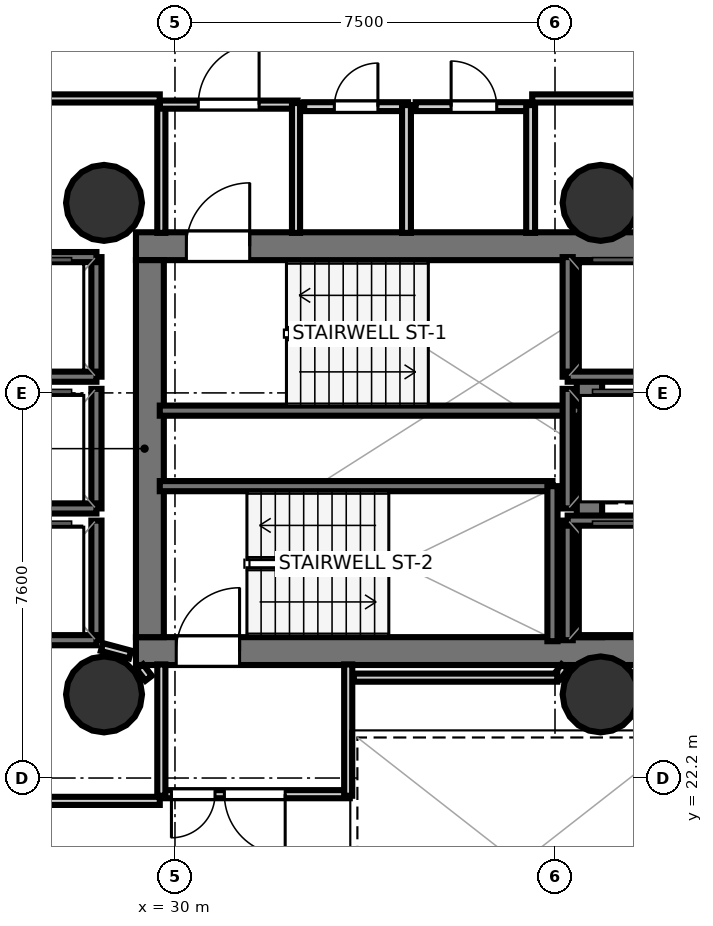
"""IFC4 building model, lengths in metres.
Left out: names, types, materials, properties, quantities, classifications, styles, units other than length and angle.
Written with IfcOpenShell. Run it as: python <this file> out.ifc"""

import sys

from ifc_helpers import new_model, si_unit, direction, frame, frame_2d, origin, origin_2d, place, context, subcontext, project, spatial, rectangle, hollow_circle, extrude, element, fill, save


model = new_model("IFC4")
c1 = context("Model", 3, precision=1e-05, world=origin(), true_north=direction((0.0, 1.0)))
c2 = subcontext(c1, "Body", "Model", "MODEL_VIEW")
j1 = project(units=[si_unit("LENGTHUNIT", "METRE"), si_unit("PLANEANGLEUNIT", "RADIAN")], contexts=[c1])
p1 = place(None, origin())
s1 = spatial("IfcSite", under=j1, at=p1, CompositionType="ELEMENT")
p2 = place(p1, origin())
s2 = spatial("IfcBuilding", under=s1, at=p2, CompositionType="ELEMENT")
p3 = place(p2, frame((0.0, 0.0, 105.2)))
s3 = spatial("IfcBuildingStorey", under=s2, at=p3, CompositionType="ELEMENT", Elevation=105.2)
p4 = place(p3, frame((29.23, 32.695, 0.0), z_axis=(0.0, 0.0, 1.0), x_axis=(1.0, 0.0, 0.0)))
e1 = element("IfcWall", 1, at=p4, inside=s3, PredefinedType="SHEAR", context=c2, shape_type="SweptSolid", body=[
    extrude(rectangle(XDim=10.62, YDim=0.55, at=frame_2d((5.31, 0.0))), origin(), (0.0, 0.0, 1.0), 3.52),
])
p5 = place(p4, frame((0.995, 0.0, 0.0)))
e2 = element("IfcOpeningElement", 2, at=p5, cuts=e1, PredefinedType="OPENING", context=c2, shape_type="SweptSolid", body=[
    extrude(rectangle(XDim=1.25, YDim=2.15, at=frame_2d((0.625, 1.075))), frame((0.0, 0.285, 0.0), z_axis=(0.0, -1.0, 0.0), x_axis=(1.0, 0.0, 0.0)), (0.0, 0.0, 1.0), 0.57),
])
p6 = place(p3, frame((29.23, 24.705, 0.0), z_axis=(0.0, 0.0, 1.0), x_axis=(1.0, 0.0, 0.0)))
e3 = element("IfcWall", 3, at=p6, inside=s3, PredefinedType="SHEAR", context=c2, shape_type="SweptSolid", body=[
    extrude(rectangle(XDim=10.62, YDim=0.55, at=frame_2d((5.31, 0.0))), origin(), (0.0, 0.0, 1.0), 3.52),
])
p7 = place(p6, frame((0.795, 0.0, 0.0)))
e4 = element("IfcOpeningElement", 4, at=p7, cuts=e3, PredefinedType="OPENING", context=c2, shape_type="SweptSolid", body=[
    extrude(rectangle(XDim=1.25, YDim=2.15, at=frame_2d((0.625, 1.075))), frame((0.0, 0.285, 0.0), z_axis=(0.0, -1.0, 0.0), x_axis=(1.0, 0.0, 0.0)), (0.0, 0.0, 1.0), 0.57),
])
p8 = place(p3, frame((29.505, 24.98, 0.0), z_axis=(0.0, 0.0, 1.0), x_axis=(0.0, 1.0, 0.0)))
e5 = element("IfcWall", 5, at=p8, inside=s3, PredefinedType="SHEAR", context=c2, shape_type="SweptSolid", body=[
    extrude(rectangle(XDim=7.44, YDim=0.55, at=frame_2d((3.72, 0.0))), origin(), (0.0, 0.0, 1.0), 3.52),
])
p9 = place(p3, frame((38.18, 24.98, 0.0), z_axis=(0.0, 0.0, 1.0), x_axis=(0.0, 1.0, 0.0)))
e6 = element("IfcWall", 6, at=p9, inside=s3, PredefinedType="SHEAR", context=c2, shape_type="SweptSolid", body=[
    extrude(rectangle(XDim=7.44, YDim=0.5, at=frame_2d((3.72, 0.0))), origin(), (0.0, 0.0, 1.0), 3.52),
])
for number, where, z_axis, x_axis in (
    (7, (28.6, 33.55, 0.0), (0.0, 0.0, 1.0), (1.0, 0.0, 0.0)),
    (8, (28.6, 23.85, 0.0), (0.0, 0.0, 1.0), (1.0, 0.0, 0.0)),
    (9, (38.4, 33.55, 0.0), (0.0, 0.0, 1.0), (1.0, 0.0, 0.0)),
    (10, (38.4, 23.85, 0.0), (0.0, 0.0, 1.0), (1.0, 0.0, 0.0)),
):
    element("IfcColumn", number, at=place(p3, frame(where, z_axis=z_axis, x_axis=x_axis)), inside=s3, PredefinedType="COLUMN", context=c2, shape_type="SweptSolid", body=[
        extrude(hollow_circle(Radius=0.75, WallThickness=0.036, at=origin_2d()), origin(), (0.0, 0.0, 1.0), 3.7),
    ])
p10 = place(p3, frame((29.7, 29.45, 0.0), z_axis=(0.0, 0.0, 1.0), x_axis=(1.0, 0.0, 0.0)))
e11 = element("IfcWall", 11, at=p10, inside=s3, PredefinedType="SOLIDWALL", context=c2, shape_type="SweptSolid", body=[
    extrude(rectangle(XDim=8.3, YDim=0.2, at=frame_2d((4.15, 0.0))), origin(), (0.0, 0.0, 1.0), 3.52),
])
p11 = place(p3, frame((29.7, 27.96, 0.0), z_axis=(0.0, 0.0, 1.0), x_axis=(1.0, 0.0, 0.0)))
e12 = element("IfcWall", 12, at=p11, inside=s3, PredefinedType="SOLIDWALL", context=c2, shape_type="SweptSolid", body=[
    extrude(rectangle(XDim=7.75, YDim=0.2, at=frame_2d((3.875, 0.0))), origin(), (0.0, 0.0, 1.0), 3.52),
])
p12 = place(p3, frame((37.45, 24.9, 0.0), z_axis=(0.0, 0.0, 1.0), x_axis=(0.0, 1.0, 0.0)))
e13 = element("IfcWall", 13, at=p12, inside=s3, PredefinedType="SOLIDWALL", context=c2, shape_type="SweptSolid", body=[
    extrude(rectangle(XDim=3.06, YDim=0.2, at=frame_2d((1.53, 0.0))), origin(), (0.0, 0.0, 1.0), 3.52),
])
p13 = place(p3, frame((37.75, 30.12, 0.0), z_axis=(0.0, 0.0, 1.0), x_axis=(0.0, 1.0, 0.0)))
e14 = element("IfcWall", 14, at=p13, inside=s3, PredefinedType="SOLIDWALL", context=c2, shape_type="SweptSolid", body=[
    extrude(rectangle(XDim=2.36, YDim=0.2, at=frame_2d((1.18, 0.0))), origin(), (0.0, 0.0, 1.0), 3.52),
])
p14 = place(p3, frame((37.75, 30.12, 0.0), z_axis=(0.0, 0.0, 1.0), x_axis=(1.0, 0.0, 0.0)))
e15 = element("IfcWall", 15, at=p14, inside=s3, PredefinedType="SOLIDWALL", context=c2, shape_type="SweptSolid", body=[
    extrude(rectangle(XDim=2.1, YDim=0.2, at=frame_2d((1.05, 0.0))), origin(), (0.0, 0.0, 1.0), 3.52),
])
p15 = place(p3, frame((37.75, 24.92, 0.0), z_axis=(0.0, 0.0, 1.0), x_axis=(0.0, 1.0, 0.0)))
e16 = element("IfcWall", 16, at=p15, inside=s3, PredefinedType="SOLIDWALL", context=c2, shape_type="SweptSolid", body=[
    extrude(rectangle(XDim=2.36, YDim=0.2, at=frame_2d((1.18, 0.0))), origin(), (0.0, 0.0, 1.0), 3.52),
])
p16 = place(p3, frame((37.75, 27.28, 0.0), z_axis=(0.0, 0.0, 1.0), x_axis=(1.0, 0.0, 0.0)))
e17 = element("IfcWall", 17, at=p16, inside=s3, PredefinedType="SOLIDWALL", context=c2, shape_type="SweptSolid", body=[
    extrude(rectangle(XDim=2.1, YDim=0.2, at=frame_2d((1.05, 0.0))), origin(), (0.0, 0.0, 1.0), 3.52),
])
p17 = place(p3, frame((28.45, 30.12, 0.0), z_axis=(0.0, 0.0, 1.0), x_axis=(0.0, 1.0, 0.0)))
e18 = element("IfcWall", 18, at=p17, inside=s3, PredefinedType="SOLIDWALL", context=c2, shape_type="SweptSolid", body=[
    extrude(rectangle(XDim=2.36, YDim=0.2, at=frame_2d((1.18, 0.0))), origin(), (0.0, 0.0, 1.0), 3.52),
])
for number, where, z_axis, x_axis in (
    (19, (26.35, 32.48, 0.0), (0.0, 0.0, 1.0), (1.0, 0.0, 0.0)),
    (20, (26.35, 30.12, 0.0), (0.0, 0.0, 1.0), (1.0, 0.0, 0.0)),
):
    element("IfcWall", number, at=place(p3, frame(where, z_axis=z_axis, x_axis=x_axis)), inside=s3, PredefinedType="SOLIDWALL", context=c2, shape_type="SweptSolid", body=[
        extrude(rectangle(XDim=2.1, YDim=0.2, at=frame_2d((1.05, 0.0))), origin(), (0.0, 0.0, 1.0), 3.52),
    ])
p18 = place(p3, frame((28.45, 27.52, 0.0), z_axis=(0.0, 0.0, 1.0), x_axis=(0.0, 1.0, 0.0)))
e21 = element("IfcWall", 21, at=p18, inside=s3, PredefinedType="SOLIDWALL", context=c2, shape_type="SweptSolid", body=[
    extrude(rectangle(XDim=2.36, YDim=0.2, at=frame_2d((1.18, 0.0))), origin(), (0.0, 0.0, 1.0), 3.52),
])
p19 = place(p3, frame((26.35, 27.52, 0.0), z_axis=(0.0, 0.0, 1.0), x_axis=(1.0, 0.0, 0.0)))
e22 = element("IfcWall", 22, at=p19, inside=s3, PredefinedType="SOLIDWALL", context=c2, shape_type="SweptSolid", body=[
    extrude(rectangle(XDim=2.1, YDim=0.2, at=frame_2d((1.05, 0.0))), origin(), (0.0, 0.0, 1.0), 3.52),
])
p20 = place(p3, frame((28.45, 24.92, 0.0), z_axis=(0.0, 0.0, 1.0), x_axis=(0.0, 1.0, 0.0)))
e23 = element("IfcWall", 23, at=p20, inside=s3, PredefinedType="SOLIDWALL", context=c2, shape_type="SweptSolid", body=[
    extrude(rectangle(XDim=2.36, YDim=0.2, at=frame_2d((1.18, 0.0))), origin(), (0.0, 0.0, 1.0), 3.52),
])
p21 = place(p3, frame((26.35, 24.92, 0.0), z_axis=(0.0, 0.0, 1.0), x_axis=(1.0, 0.0, 0.0)))
e24 = element("IfcWall", 24, at=p21, inside=s3, PredefinedType="SOLIDWALL", context=c2, shape_type="SweptSolid", body=[
    extrude(rectangle(XDim=2.1, YDim=0.2, at=frame_2d((1.05, 0.0))), origin(), (0.0, 0.0, 1.0), 3.52),
])
p22 = place(p3, frame((37.75, 27.52, 0.0), z_axis=(0.0, 0.0, 1.0), x_axis=(0.0, 1.0, 0.0)))
e25 = element("IfcWall", 25, at=p22, inside=s3, PredefinedType="SOLIDWALL", context=c2, shape_type="SweptSolid", body=[
    extrude(rectangle(XDim=2.36, YDim=0.2, at=frame_2d((1.18, 0.0))), origin(), (0.0, 0.0, 1.0), 3.52),
])
p23 = place(p3, frame((29.731, 32.958, 0.0), z_axis=(0.0, 0.0, 1.0), x_axis=(0.0, 1.0, 0.0)))
e26 = element("IfcWall", 26, at=p23, inside=s3, PredefinedType="PARTITIONING", context=c2, shape_type="SweptSolid", body=[
    extrude(rectangle(XDim=2.562, YDim=0.16, at=frame_2d((1.281, 0.0))), origin(), (0.0, 0.0, 1.0), 2.84),
])
p24 = place(p3, frame((29.7, 35.489, 0.0), z_axis=(0.0, 0.0, 1.0), x_axis=(1.0, 0.0, 0.0)))
e27 = element("IfcWall", 27, at=p24, inside=s3, PredefinedType="PARTITIONING", context=c2, shape_type="SweptSolid", body=[
    extrude(rectangle(XDim=2.72, YDim=0.16, at=frame_2d((1.36, 0.0))), origin(), (0.0, 0.0, 1.0), 2.84),
])
p25 = place(p24, frame((0.76, 0.0, 0.0)))
e28 = element("IfcOpeningElement", 28, at=p25, cuts=e27, PredefinedType="OPENING", context=c2, shape_type="SweptSolid", body=[
    extrude(rectangle(XDim=1.2, YDim=2.15, at=frame_2d((0.6, 1.075))), frame((0.0, 0.09, 0.0), z_axis=(0.0, -1.0, 0.0), x_axis=(1.0, 0.0, 0.0)), (0.0, 0.0, 1.0), 0.18),
])
p26 = place(p3, frame((32.389, 35.52, 0.0), z_axis=(0.0, 0.0, 1.0), x_axis=(0.0, -1.0, 0.0)))
e29 = element("IfcWall", 29, at=p26, inside=s3, PredefinedType="PARTITIONING", context=c2, shape_type="SweptSolid", body=[
    extrude(rectangle(XDim=2.562, YDim=0.16, at=frame_2d((1.281, 0.0))), origin(), (0.0, 0.0, 1.0), 2.84),
])
p27 = place(p3, frame((33.45, 21.881, 0.0), z_axis=(0.0, 0.0, 1.0), x_axis=(-1.0, 0.0, 0.0)))
e30 = element("IfcWall", 30, at=p27, inside=s3, PredefinedType="PARTITIONING", context=c2, shape_type="SweptSolid", body=[
    extrude(rectangle(XDim=3.75, YDim=0.16, at=frame_2d((1.875, 0.0))), origin(), (0.0, 0.0, 1.0), 2.84),
])
p28 = place(p27, frame((1.275, 0.0, 0.0)))
e31 = element("IfcOpeningElement", 31, at=p28, cuts=e30, PredefinedType="OPENING", context=c2, shape_type="SweptSolid", body=[
    extrude(rectangle(XDim=1.2, YDim=2.15, at=frame_2d((0.6, 1.075))), frame((0.0, 0.09, 0.0), z_axis=(0.0, -1.0, 0.0), x_axis=(1.0, 0.0, 0.0)), (0.0, 0.0, 1.0), 0.18),
])
p29 = place(p27, frame((2.66, 0.0, 0.0)))
e32 = element("IfcOpeningElement", 32, at=p29, cuts=e30, PredefinedType="OPENING", context=c2, shape_type="SweptSolid", body=[
    extrude(rectangle(XDim=0.86, YDim=2.05, at=frame_2d((0.43, 1.025))), frame((0.0, 0.09, 0.0), z_axis=(0.0, -1.0, 0.0), x_axis=(1.0, 0.0, 0.0)), (0.0, 0.0, 1.0), 0.18),
])
for number, where, z_axis, x_axis in (
    (33, (29.731, 21.85, 0.0), (0.0, 0.0, 1.0), (0.0, 1.0, 0.0)),
    (34, (33.419, 24.442, 0.0), (0.0, 0.0, 1.0), (0.0, -1.0, 0.0)),
):
    element("IfcWall", number, at=place(p3, frame(where, z_axis=z_axis, x_axis=x_axis)), inside=s3, PredefinedType="PARTITIONING", context=c2, shape_type="SweptSolid", body=[
        extrude(rectangle(XDim=2.592, YDim=0.16, at=frame_2d((1.296, 0.0))), origin(), (0.0, 0.0, 1.0), 2.84),
    ])
p30 = place(p3, frame((32.55, 35.449, 0.0), z_axis=(0.0, 0.0, 1.0), x_axis=(1.0, 0.0, 0.0)))
e35 = element("IfcWall", 35, at=p30, inside=s3, PredefinedType="PLUMBINGWALL", context=c2, shape_type="SweptSolid", body=[
    extrude(rectangle(XDim=2.05, YDim=0.175, at=frame_2d((1.025, 0.0))), origin(), (0.0, 0.0, 1.0), 2.84),
])
p31 = place(p30, frame((0.595, 0.0, 0.0)))
e36 = element("IfcOpeningElement", 36, at=p31, cuts=e35, PredefinedType="OPENING", context=c2, shape_type="SweptSolid", body=[
    extrude(rectangle(XDim=0.86, YDim=2.05, at=frame_2d((0.43, 1.025))), frame((0.0, 0.097, 0.0), z_axis=(0.0, -1.0, 0.0), x_axis=(1.0, 0.0, 0.0)), (0.0, 0.0, 1.0), 0.195),
])
p32 = place(p3, frame((34.569, 35.48, 0.0), z_axis=(0.0, 0.0, 1.0), x_axis=(0.0, -1.0, 0.0)))
e37 = element("IfcWall", 37, at=p32, inside=s3, PredefinedType="PLUMBINGWALL", context=c2, shape_type="SweptSolid", body=[
    extrude(rectangle(XDim=2.522, YDim=0.175, at=frame_2d((1.261, 0.0))), origin(), (0.0, 0.0, 1.0), 2.84),
])
p33 = place(p3, frame((34.75, 35.449, 0.0), z_axis=(0.0, 0.0, 1.0), x_axis=(1.0, 0.0, 0.0)))
e38 = element("IfcWall", 38, at=p33, inside=s3, PredefinedType="PLUMBINGWALL", context=c2, shape_type="SweptSolid", body=[
    extrude(rectangle(XDim=2.3, YDim=0.175, at=frame_2d((1.15, 0.0))), origin(), (0.0, 0.0, 1.0), 2.84),
])
p34 = place(p33, frame((0.7, 0.0, 0.0)))
e39 = element("IfcOpeningElement", 39, at=p34, cuts=e38, PredefinedType="OPENING", context=c2, shape_type="SweptSolid", body=[
    extrude(rectangle(XDim=0.9, YDim=2.1, at=frame_2d((0.45, 1.05))), frame((0.0, 0.097, 0.0), z_axis=(0.0, -1.0, 0.0), x_axis=(1.0, 0.0, 0.0)), (0.0, 0.0, 1.0), 0.195),
])
p35 = place(p3, frame((37.019, 35.48, 0.0), z_axis=(0.0, 0.0, 1.0), x_axis=(0.0, -1.0, 0.0)))
e40 = element("IfcWall", 40, at=p35, inside=s3, PredefinedType="PLUMBINGWALL", context=c2, shape_type="SweptSolid", body=[
    extrude(rectangle(XDim=2.522, YDim=0.175, at=frame_2d((1.261, 0.0))), origin(), (0.0, 0.0, 1.0), 2.84),
])
p36 = place(p3, frame((29.48, 24.169, 0.0), z_axis=(0.0, 0.0, 1.0), x_axis=(-0.607608252226, 0.794236873878, 0.0)))
e41 = element("IfcWall", 41, at=p36, inside=s3, PredefinedType="PARTITIONING", context=c2, shape_type="SweptSolid", body=[
    extrude(rectangle(XDim=0.286, YDim=0.16, at=frame_2d((0.143, 0.0))), origin(), (0.0, 0.0, 1.0), 2.84),
])
p37 = place(p3, frame((29.114, 24.637, 0.0), z_axis=(0.0, 0.0, 1.0), x_axis=(-0.966199685486, 0.257794817183, 0.0)))
e42 = element("IfcWall", 42, at=p37, inside=s3, PredefinedType="PARTITIONING", context=c2, shape_type="SweptSolid", body=[
    extrude(rectangle(XDim=0.575, YDim=0.16, at=frame_2d((0.288, 0.0))), origin(), (0.0, 0.0, 1.0), 2.84),
])
p38 = place(p3, frame((37.694, 24.396, 0.0), z_axis=(0.0, 0.0, 1.0), x_axis=(-0.607118658061, -0.794611184815, 0.0)))
e43 = element("IfcWall", 43, at=p38, inside=s3, PredefinedType="PARTITIONING", context=c2, shape_type="SweptSolid", body=[
    extrude(rectangle(XDim=0.246, YDim=0.16, at=frame_2d((0.123, 0.0))), origin(), (0.0, 0.0, 1.0), 2.84),
])
p39 = place(p3, frame((37.545, 24.181, 0.0), z_axis=(0.0, 0.0, 1.0), x_axis=(-1.0, 0.0, 0.0)))
e44 = element("IfcWall", 44, at=p39, inside=s3, PredefinedType="PARTITIONING", context=c2, shape_type="SweptSolid", body=[
    extrude(rectangle(XDim=4.015, YDim=0.16, at=frame_2d((2.007, 0.0))), origin(), (0.0, 0.0, 1.0), 2.84),
])
p40 = place(p3, frame((39.818, 35.611, 0.0), z_axis=(0.0, 0.0, 1.0), x_axis=(-1.0, 0.0, 0.0)))
e45 = element("IfcWall", 45, at=p40, inside=s3, PredefinedType="PARTITIONING", context=c2, shape_type="SweptSolid", body=[
    extrude(rectangle(XDim=2.768, YDim=0.16, at=frame_2d((1.384, 0.0))), origin(), (0.0, 0.0, 1.0), 2.84),
])
for number, where, z_axis, x_axis in (
    (46, (29.7, 35.611, 0.0), (0.0, 0.0, 1.0), (-1.0, 0.0, 0.0)),
    (47, (26.42, 21.749, 0.0), (0.0, 0.0, 1.0), (1.0, 0.0, 0.0)),
):
    element("IfcWall", number, at=place(p3, frame(where, z_axis=z_axis, x_axis=x_axis)), inside=s3, PredefinedType="PARTITIONING", context=c2, shape_type="SweptSolid", body=[
        extrude(rectangle(XDim=3.28, YDim=0.16, at=frame_2d((1.64, 0.0))), origin(), (0.0, 0.0, 1.0), 2.84),
    ])
p41 = place(p5, origin())
e48 = element("IfcDoor", 48, at=p41, inside=s3, OperationType="SINGLE_SWING_RIGHT", PredefinedType="DOOR", context=c2, shape_type="SweptSolid", body=[
    extrude(rectangle(XDim=1.25, YDim=2.15, at=frame_2d((0.625, 1.075))), frame((0.0, 0.025, 0.0), z_axis=(0.0, -1.0, 0.0), x_axis=(1.0, 0.0, 0.0)), (0.0, 0.0, 1.0), 0.05),
])
fill(e2, e48)
p42 = place(p7, origin())
e49 = element("IfcDoor", 49, at=p42, inside=s3, OperationType="SINGLE_SWING_RIGHT", PredefinedType="DOOR", context=c2, shape_type="SweptSolid", body=[
    extrude(rectangle(XDim=1.25, YDim=2.15, at=frame_2d((0.625, 1.075))), frame((0.0, 0.025, 0.0), z_axis=(0.0, -1.0, 0.0), x_axis=(1.0, 0.0, 0.0)), (0.0, 0.0, 1.0), 0.05),
])
fill(e4, e49)
p43 = place(p25, origin())
e50 = element("IfcDoor", 50, at=p43, inside=s3, OperationType="SINGLE_SWING_RIGHT", PredefinedType="DOOR", context=c2, shape_type="SweptSolid", body=[
    extrude(rectangle(XDim=1.2, YDim=2.15, at=frame_2d((0.6, 1.075))), frame((0.0, 0.025, 0.0), z_axis=(0.0, -1.0, 0.0), x_axis=(1.0, 0.0, 0.0)), (0.0, 0.0, 1.0), 0.05),
])
fill(e28, e50)
p44 = place(p28, origin())
e51 = element("IfcDoor", 51, at=p44, inside=s3, OperationType="SINGLE_SWING_LEFT", PredefinedType="DOOR", context=c2, shape_type="SweptSolid", body=[
    extrude(rectangle(XDim=1.2, YDim=2.15, at=frame_2d((0.6, 1.075))), frame((0.0, 0.025, 0.0), z_axis=(0.0, -1.0, 0.0), x_axis=(1.0, 0.0, 0.0)), (0.0, 0.0, 1.0), 0.05),
])
fill(e31, e51)
p45 = place(p31, origin())
e52 = element("IfcDoor", 52, at=p45, inside=s3, OperationType="SINGLE_SWING_RIGHT", PredefinedType="DOOR", context=c2, shape_type="SweptSolid", body=[
    extrude(rectangle(XDim=0.86, YDim=2.05, at=frame_2d((0.43, 1.025))), frame((0.0, 0.025, 0.0), z_axis=(0.0, -1.0, 0.0), x_axis=(1.0, 0.0, 0.0)), (0.0, 0.0, 1.0), 0.05),
])
fill(e36, e52)
p46 = place(p34, origin())
e53 = element("IfcDoor", 53, at=p46, inside=s3, OperationType="SINGLE_SWING_LEFT", PredefinedType="DOOR", context=c2, shape_type="SweptSolid", body=[
    extrude(rectangle(XDim=0.9, YDim=2.1, at=frame_2d((0.45, 1.05))), frame((0.0, 0.025, 0.0), z_axis=(0.0, -1.0, 0.0), x_axis=(1.0, 0.0, 0.0)), (0.0, 0.0, 1.0), 0.05),
])
fill(e39, e53)
p47 = place(p29, origin())
e54 = element("IfcDoor", 54, at=p47, inside=s3, OperationType="SINGLE_SWING_RIGHT", PredefinedType="DOOR", context=c2, shape_type="SweptSolid", body=[
    extrude(rectangle(XDim=0.86, YDim=2.05, at=frame_2d((0.43, 1.025))), frame((0.0, 0.025, 0.0), z_axis=(0.0, -1.0, 0.0), x_axis=(1.0, 0.0, 0.0)), (0.0, 0.0, 1.0), 0.05),
])
fill(e32, e54)
save(model, sys.argv[1])
